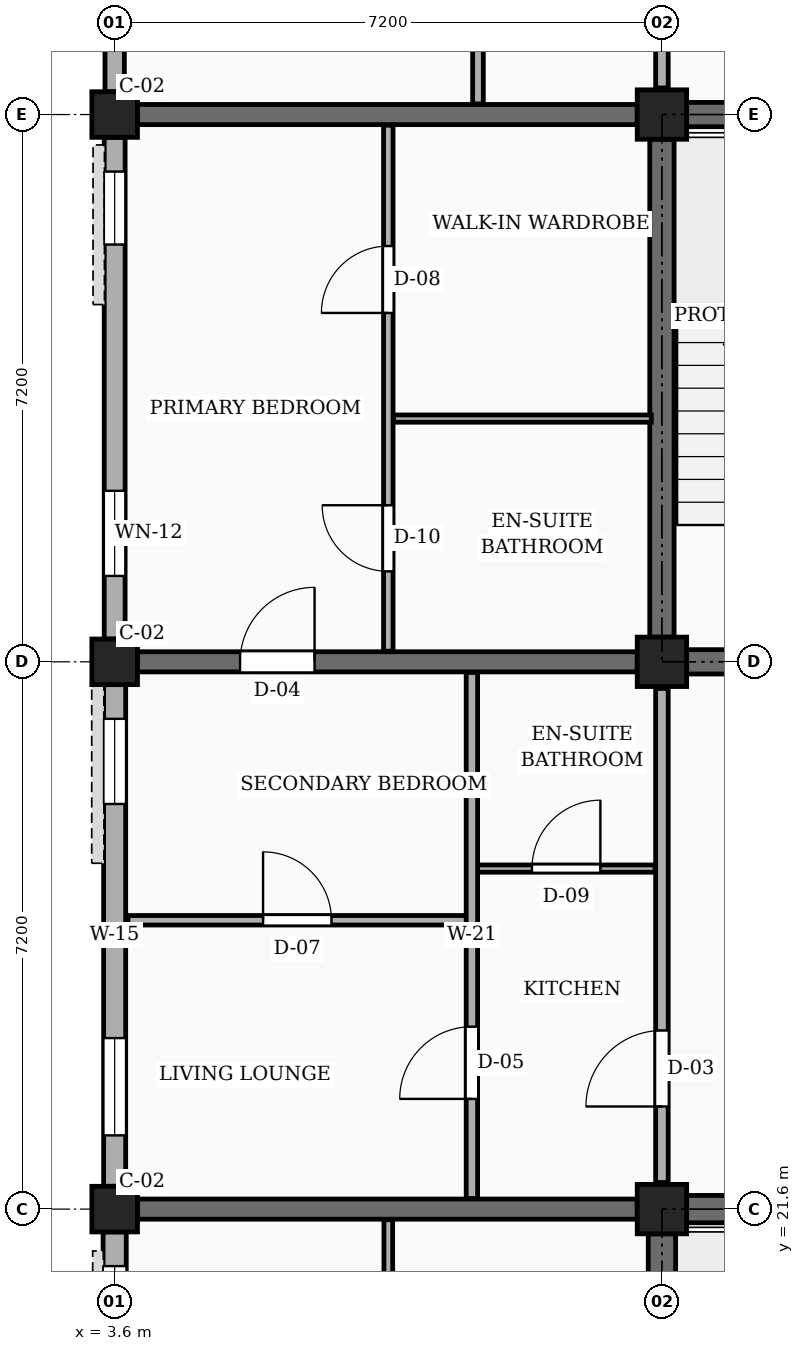
"""IFC4 building model, lengths in metres.
Left out: names, types, materials, properties, quantities, classifications, styles, units other than length and angle.
Written with IfcOpenShell. Run it as: python <this file> out.ifc"""

import sys

from ifc_helpers import new_model, si_unit, direction, frame, frame_2d, origin, origin_2d, place, context, subcontext, project, spatial, rectangle, extrude, element, fill, save


model = new_model("IFC4")
c1 = context("Model", 3, precision=1e-05, world=origin(), true_north=direction((0.0, 1.0)))
c2 = subcontext(c1, "Body", "Model", "MODEL_VIEW")
j1 = project(units=[si_unit("LENGTHUNIT", "METRE"), si_unit("PLANEANGLEUNIT", "RADIAN")], contexts=[c1])
p1 = place(None, origin())
s1 = spatial("IfcSite", under=j1, at=p1, CompositionType="ELEMENT")
p2 = place(p1, origin())
s2 = spatial("IfcBuilding", under=s1, at=p2, CompositionType="ELEMENT")
p3 = place(p2, frame((0.0, 0.0, 4.5)))
s3 = spatial("IfcBuildingStorey", under=s2, at=p3, CompositionType="ELEMENT", Elevation=4.5)
for number, where, z_axis, x_axis in (
    (1, (3.6, 21.6, 0.0), (0.0, 0.0, 1.0), (1.0, 0.0, 0.0)),
    (2, (3.6, 28.8, 0.0), (0.0, 0.0, 1.0), (1.0, 0.0, 0.0)),
    (3, (3.6, 36.0, 0.0), (0.0, 0.0, 1.0), (1.0, 0.0, 0.0)),
):
    element("IfcColumn", number, at=place(p3, frame(where, z_axis=z_axis, x_axis=x_axis)), inside=s3, PredefinedType="COLUMN", context=c2, shape_type="SweptSolid", body=[
        extrude(rectangle(XDim=0.6, YDim=0.6, at=origin_2d()), origin(), (0.0, 0.0, 1.0), 3.15),
    ])
for number, where, z_axis, x_axis in (
    (4, (10.8, 21.6, 0.0), (0.0, 0.0, 1.0), (1.0, 0.0, 0.0)),
    (5, (10.8, 28.8, 0.0), (0.0, 0.0, 1.0), (1.0, 0.0, 0.0)),
    (6, (10.8, 36.0, 0.0), (0.0, 0.0, 1.0), (1.0, 0.0, 0.0)),
):
    element("IfcColumn", number, at=place(p3, frame(where, z_axis=z_axis, x_axis=x_axis)), inside=s3, PredefinedType="COLUMN", context=c2, shape_type="SweptSolid", body=[
        extrude(rectangle(XDim=0.65, YDim=0.65, at=origin_2d()), origin(), (0.0, 0.0, 1.0), 3.15),
    ])
p4 = place(p3, frame((3.9, 21.6, 0.0), z_axis=(0.0, 0.0, 1.0), x_axis=(1.0, 0.0, 0.0)))
e7 = element("IfcWall", 7, at=p4, inside=s3, PredefinedType="SOLIDWALL", context=c2, shape_type="SweptSolid", body=[
    extrude(rectangle(XDim=6.575, YDim=0.265, at=frame_2d((3.288, 0.0))), origin(), (0.0, 0.0, 1.0), 2.17),
])
p5 = place(p3, frame((3.9, 28.8, 0.0), z_axis=(0.0, 0.0, 1.0), x_axis=(1.0, 0.0, 0.0)))
e8 = element("IfcWall", 8, at=p5, inside=s3, PredefinedType="SOLIDWALL", context=c2, shape_type="SweptSolid", body=[
    extrude(rectangle(XDim=6.575, YDim=0.265, at=frame_2d((3.288, 0.0))), origin(), (0.0, 0.0, 1.0), 2.17),
])
p6 = place(p5, frame((1.35, 0.0, 0.0)))
e9 = element("IfcOpeningElement", 9, at=p6, cuts=e8, PredefinedType="OPENING", context=c2, shape_type="SweptSolid", body=[
    extrude(rectangle(XDim=0.98, YDim=2.12, at=frame_2d((0.49, 1.06))), frame((0.0, 0.143, 0.0), z_axis=(0.0, -1.0, 0.0), x_axis=(1.0, 0.0, 0.0)), (0.0, 0.0, 1.0), 0.285),
])
p7 = place(p3, frame((3.9, 36.0, 0.0), z_axis=(0.0, 0.0, 1.0), x_axis=(1.0, 0.0, 0.0)))
e10 = element("IfcWall", 10, at=p7, inside=s3, PredefinedType="SOLIDWALL", context=c2, shape_type="SweptSolid", body=[
    extrude(rectangle(XDim=6.575, YDim=0.265, at=frame_2d((3.288, 0.0))), origin(), (0.0, 0.0, 1.0), 2.17),
])
p8 = place(p3, frame((3.6, 42.9, 0.0), z_axis=(0.0, 0.0, 1.0), x_axis=(0.0, -1.0, 0.0)))
e11 = element("IfcWall", 11, at=p8, inside=s3, PredefinedType="SOLIDWALL", context=c2, shape_type="SweptSolid", body=[
    extrude(rectangle(XDim=6.6, YDim=0.255, at=frame_2d((3.3, 0.0))), origin(), (0.0, 0.0, 1.0), 2.44),
])
p9 = place(p8, frame((0.45, 0.0, 0.78)))
e12 = element("IfcOpeningElement", 12, at=p9, cuts=e11, PredefinedType="OPENING", context=c2, shape_type="SweptSolid", body=[
    extrude(rectangle(XDim=1.4, YDim=1.15, at=frame_2d((0.7, 0.575))), frame((0.0, 0.137, 0.0), z_axis=(0.0, -1.0, 0.0), x_axis=(1.0, 0.0, 0.0)), (0.0, 0.0, 1.0), 0.275),
])
p10 = place(p8, frame((4.65, 0.0, 0.78)))
e13 = element("IfcOpeningElement", 13, at=p10, cuts=e11, PredefinedType="OPENING", context=c2, shape_type="SweptSolid", body=[
    extrude(rectangle(XDim=0.96, YDim=1.26, at=frame_2d((0.48, 0.63))), frame((0.0, 0.137, 0.0), z_axis=(0.0, -1.0, 0.0), x_axis=(1.0, 0.0, 0.0)), (0.0, 0.0, 1.0), 0.275),
])
p11 = place(p3, frame((3.6, 35.7, 0.0), z_axis=(0.0, 0.0, 1.0), x_axis=(0.0, -1.0, 0.0)))
e14 = element("IfcWall", 14, at=p11, inside=s3, PredefinedType="SOLIDWALL", context=c2, shape_type="SweptSolid", body=[
    extrude(rectangle(XDim=6.6, YDim=0.275, at=frame_2d((3.3, 0.0))), origin(), (0.0, 0.0, 1.0), 2.44),
])
p12 = place(p11, frame((0.45, 0.0, 0.78)))
e15 = element("IfcOpeningElement", 15, at=p12, cuts=e14, PredefinedType="OPENING", context=c2, shape_type="SweptSolid", body=[
    extrude(rectangle(XDim=0.96, YDim=1.26, at=frame_2d((0.48, 0.63))), frame((0.0, 0.147, 0.0), z_axis=(0.0, -1.0, 0.0), x_axis=(1.0, 0.0, 0.0)), (0.0, 0.0, 1.0), 0.295),
])
p13 = place(p11, frame((4.65, 0.0, 0.78)))
e16 = element("IfcOpeningElement", 16, at=p13, cuts=e14, PredefinedType="OPENING", context=c2, shape_type="SweptSolid", body=[
    extrude(rectangle(XDim=1.12, YDim=1.26, at=frame_2d((0.56, 0.63))), frame((0.0, 0.147, 0.0), z_axis=(0.0, -1.0, 0.0), x_axis=(1.0, 0.0, 0.0)), (0.0, 0.0, 1.0), 0.295),
])
p14 = place(p3, frame((3.6, 28.5, 0.0), z_axis=(0.0, 0.0, 1.0), x_axis=(0.0, -1.0, 0.0)))
e17 = element("IfcWall", 17, at=p14, inside=s3, PredefinedType="SOLIDWALL", context=c2, shape_type="SweptSolid", body=[
    extrude(rectangle(XDim=6.6, YDim=0.29, at=frame_2d((3.3, 0.0))), origin(), (0.0, 0.0, 1.0), 2.44),
])
p15 = place(p14, frame((0.45, 0.0, 0.78)))
e18 = element("IfcOpeningElement", 18, at=p15, cuts=e17, PredefinedType="OPENING", context=c2, shape_type="SweptSolid", body=[
    extrude(rectangle(XDim=1.12, YDim=1.26, at=frame_2d((0.56, 0.63))), frame((0.0, 0.155, 0.0), z_axis=(0.0, -1.0, 0.0), x_axis=(1.0, 0.0, 0.0)), (0.0, 0.0, 1.0), 0.31),
])
p16 = place(p14, frame((4.65, 0.0, 0.78)))
e19 = element("IfcOpeningElement", 19, at=p16, cuts=e17, PredefinedType="OPENING", context=c2, shape_type="SweptSolid", body=[
    extrude(rectangle(XDim=1.28, YDim=1.26, at=frame_2d((0.64, 0.63))), frame((0.0, 0.155, 0.0), z_axis=(0.0, -1.0, 0.0), x_axis=(1.0, 0.0, 0.0)), (0.0, 0.0, 1.0), 0.31),
])
p17 = place(p3, frame((3.6, 21.3, 0.0), z_axis=(0.0, 0.0, 1.0), x_axis=(0.0, -1.0, 0.0)))
e20 = element("IfcWall", 20, at=p17, inside=s3, PredefinedType="SOLIDWALL", context=c2, shape_type="SweptSolid", body=[
    extrude(rectangle(XDim=6.6, YDim=0.305, at=frame_2d((3.3, 0.0))), origin(), (0.0, 0.0, 1.0), 2.44),
])
p18 = place(p17, frame((0.45, 0.0, 0.78)))
e21 = element("IfcOpeningElement", 21, at=p18, cuts=e20, PredefinedType="OPENING", context=c2, shape_type="SweptSolid", body=[
    extrude(rectangle(XDim=1.28, YDim=1.26, at=frame_2d((0.64, 0.63))), frame((0.0, 0.163, 0.0), z_axis=(0.0, -1.0, 0.0), x_axis=(1.0, 0.0, 0.0)), (0.0, 0.0, 1.0), 0.325),
])
p19 = place(p17, frame((4.65, 0.0, 0.78)))
e22 = element("IfcOpeningElement", 22, at=p19, cuts=e20, PredefinedType="OPENING", context=c2, shape_type="SweptSolid", body=[
    extrude(rectangle(XDim=1.44, YDim=1.26, at=frame_2d((0.72, 0.63))), frame((0.0, 0.163, 0.0), z_axis=(0.0, -1.0, 0.0), x_axis=(1.0, 0.0, 0.0)), (0.0, 0.0, 1.0), 0.325),
])
p20 = place(p3, frame((10.8, 14.725, 0.0), z_axis=(0.0, 0.0, 1.0), x_axis=(0.0, 1.0, 0.0)))
e23 = element("IfcWall", 23, at=p20, inside=s3, PredefinedType="SHEAR", context=c2, shape_type="SweptSolid", body=[
    extrude(rectangle(XDim=6.55, YDim=0.36, at=frame_2d((3.275, 0.0))), origin(), (0.0, 0.0, 1.0), 2.87),
])
p21 = place(p3, frame((11.125, 21.6, 0.0), z_axis=(0.0, 0.0, 1.0), x_axis=(1.0, 0.0, 0.0)))
e24 = element("IfcWall", 24, at=p21, inside=s3, PredefinedType="SHEAR", context=c2, shape_type="SweptSolid", body=[
    extrude(rectangle(XDim=6.55, YDim=0.36, at=frame_2d((3.275, 0.0))), origin(), (0.0, 0.0, 1.0), 2.87),
])
for number, where, z_axis, x_axis in (
    (25, (10.8, 29.125, 0.0), (0.0, 0.0, 1.0), (0.0, 1.0, 0.0)),
    (26, (11.125, 36.0, 0.0), (0.0, 0.0, 1.0), (1.0, 0.0, 0.0)),
    (27, (11.125, 28.8, 0.0), (0.0, 0.0, 1.0), (1.0, 0.0, 0.0)),
):
    element("IfcWall", number, at=place(p3, frame(where, z_axis=z_axis, x_axis=x_axis)), inside=s3, PredefinedType="SHEAR", context=c2, shape_type="SweptSolid", body=[
        extrude(rectangle(XDim=6.55, YDim=0.32, at=frame_2d((3.275, 0.0))), origin(), (0.0, 0.0, 1.0), 2.87),
    ])
p22 = place(p3, frame((10.8, 21.95, 0.0), z_axis=(0.0, 0.0, 1.0), x_axis=(0.0, 1.0, 0.0)))
e28 = element("IfcWall", 28, at=p22, inside=s3, PredefinedType="PARTITIONING", context=c2, shape_type="SweptSolid", body=[
    extrude(rectangle(XDim=6.5, YDim=0.165, at=frame_2d((3.25, 0.0))), origin(), (0.0, 0.0, 1.0), 2.22),
])
p23 = place(p22, frame((1.0, 0.0, 0.0)))
e29 = element("IfcOpeningElement", 29, at=p23, cuts=e28, PredefinedType="OPENING", context=c2, shape_type="SweptSolid", body=[
    extrude(rectangle(XDim=1.0, YDim=2.15, at=frame_2d((0.5, 1.075))), frame((0.0, 0.093, 0.0), z_axis=(0.0, -1.0, 0.0), x_axis=(1.0, 0.0, 0.0)), (0.0, 0.0, 1.0), 0.185),
])
p24 = place(p3, frame((10.8, 36.35, 0.0), z_axis=(0.0, 0.0, 1.0), x_axis=(0.0, 1.0, 0.0)))
e30 = element("IfcWall", 30, at=p24, inside=s3, PredefinedType="PARTITIONING", context=c2, shape_type="SweptSolid", body=[
    extrude(rectangle(XDim=6.5, YDim=0.165, at=frame_2d((3.25, 0.0))), origin(), (0.0, 0.0, 1.0), 2.22),
])
p25 = place(p24, frame((1.0, 0.0, 0.0)))
e31 = element("IfcOpeningElement", 31, at=p25, cuts=e30, PredefinedType="OPENING", context=c2, shape_type="SweptSolid", body=[
    extrude(rectangle(XDim=0.94, YDim=2.12, at=frame_2d((0.47, 1.06))), frame((0.0, 0.093, 0.0), z_axis=(0.0, -1.0, 0.0), x_axis=(1.0, 0.0, 0.0)), (0.0, 0.0, 1.0), 0.185),
])
p26 = place(p3, frame((7.2, 14.54, 0.0), z_axis=(0.0, 0.0, 1.0), x_axis=(0.0, 1.0, 0.0)))
e32 = element("IfcWall", 32, at=p26, inside=s3, PredefinedType="PARTITIONING", context=c2, shape_type="SweptSolid", body=[
    extrude(rectangle(XDim=6.92, YDim=0.115, at=frame_2d((3.46, 0.0))), origin(), (0.0, 0.0, 1.0), 2.305),
])
p27 = place(p26, frame((1.05, 0.0, 0.0)))
e33 = element("IfcOpeningElement", 33, at=p27, cuts=e32, PredefinedType="OPENING", context=c2, shape_type="SweptSolid", body=[
    extrude(rectangle(XDim=0.87, YDim=2.05, at=frame_2d((0.435, 1.025))), frame((0.0, 0.067, 0.0), z_axis=(0.0, -1.0, 0.0), x_axis=(1.0, 0.0, 0.0)), (0.0, 0.0, 1.0), 0.135),
])
p28 = place(p26, frame((4.45, 0.0, 0.0)))
e34 = element("IfcOpeningElement", 34, at=p28, cuts=e32, PredefinedType="OPENING", context=c2, shape_type="SweptSolid", body=[
    extrude(rectangle(XDim=0.88, YDim=2.08, at=frame_2d((0.44, 1.04))), frame((0.0, 0.067, 0.0), z_axis=(0.0, -1.0, 0.0), x_axis=(1.0, 0.0, 0.0)), (0.0, 0.0, 1.0), 0.135),
])
p29 = place(p3, frame((3.775, 25.4, 0.0), z_axis=(0.0, 0.0, 1.0), x_axis=(1.0, 0.0, 0.0)))
e35 = element("IfcWall", 35, at=p29, inside=s3, PredefinedType="PARTITIONING", context=c2, shape_type="SweptSolid", body=[
    extrude(rectangle(XDim=4.455, YDim=0.125, at=frame_2d((2.228, 0.0))), origin(), (0.0, 0.0, 1.0), 2.305),
])
p30 = place(p29, frame((1.778, 0.0, 0.0)))
e36 = element("IfcOpeningElement", 36, at=p30, cuts=e35, PredefinedType="OPENING", context=c2, shape_type="SweptSolid", body=[
    extrude(rectangle(XDim=0.9, YDim=2.1, at=frame_2d((0.45, 1.05))), frame((0.0, 0.073, 0.0), z_axis=(0.0, -1.0, 0.0), x_axis=(1.0, 0.0, 0.0)), (0.0, 0.0, 1.0), 0.145),
])
p31 = place(p3, frame((8.37, 26.08, 0.0), z_axis=(0.0, 0.0, 1.0), x_axis=(1.0, 0.0, 0.0)))
e37 = element("IfcWall", 37, at=p31, inside=s3, PredefinedType="PARTITIONING", context=c2, shape_type="SweptSolid", body=[
    extrude(rectangle(XDim=2.34, YDim=0.095, at=frame_2d((1.17, 0.0))), origin(), (0.0, 0.0, 1.0), 2.305),
])
p32 = place(p31, frame((0.72, 0.0, 0.0)))
e38 = element("IfcOpeningElement", 38, at=p32, cuts=e37, PredefinedType="OPENING", context=c2, shape_type="SweptSolid", body=[
    extrude(rectangle(XDim=0.9, YDim=2.05, at=frame_2d((0.45, 1.025))), frame((0.0, 0.058, 0.0), z_axis=(0.0, -1.0, 0.0), x_axis=(1.0, 0.0, 0.0)), (0.0, 0.0, 1.0), 0.115),
])
p33 = place(p3, frame((8.3, 21.74, 0.0), z_axis=(0.0, 0.0, 1.0), x_axis=(0.0, 1.0, 0.0)))
e39 = element("IfcWall", 39, at=p33, inside=s3, PredefinedType="PARTITIONING", context=c2, shape_type="SweptSolid", body=[
    extrude(rectangle(XDim=6.92, YDim=0.15, at=frame_2d((3.46, 0.0))), origin(), (0.0, 0.0, 1.0), 2.305),
])
p34 = place(p33, frame((1.31, 0.0, 0.0)))
e40 = element("IfcOpeningElement", 40, at=p34, cuts=e39, PredefinedType="OPENING", context=c2, shape_type="SweptSolid", body=[
    extrude(rectangle(XDim=0.95, YDim=2.1, at=frame_2d((0.475, 1.05))), frame((0.0, 0.085, 0.0), z_axis=(0.0, -1.0, 0.0), x_axis=(1.0, 0.0, 0.0)), (0.0, 0.0, 1.0), 0.17),
])
p35 = place(p3, frame((7.2, 28.94, 0.0), z_axis=(0.0, 0.0, 1.0), x_axis=(0.0, 1.0, 0.0)))
e41 = element("IfcWall", 41, at=p35, inside=s3, PredefinedType="PARTITIONING", context=c2, shape_type="SweptSolid", body=[
    extrude(rectangle(XDim=6.92, YDim=0.125, at=frame_2d((3.46, 0.0))), origin(), (0.0, 0.0, 1.0), 2.305),
])
p36 = place(p35, frame((1.05, 0.0, 0.0)))
e42 = element("IfcOpeningElement", 42, at=p36, cuts=e41, PredefinedType="OPENING", context=c2, shape_type="SweptSolid", body=[
    extrude(rectangle(XDim=0.87, YDim=2.05, at=frame_2d((0.435, 1.025))), frame((0.0, 0.073, 0.0), z_axis=(0.0, -1.0, 0.0), x_axis=(1.0, 0.0, 0.0)), (0.0, 0.0, 1.0), 0.145),
])
p37 = place(p35, frame((4.45, 0.0, 0.0)))
e43 = element("IfcOpeningElement", 43, at=p37, cuts=e41, PredefinedType="OPENING", context=c2, shape_type="SweptSolid", body=[
    extrude(rectangle(XDim=0.88, YDim=2.08, at=frame_2d((0.44, 1.04))), frame((0.0, 0.073, 0.0), z_axis=(0.0, -1.0, 0.0), x_axis=(1.0, 0.0, 0.0)), (0.0, 0.0, 1.0), 0.145),
])
p38 = place(p3, frame((7.27, 32.0, 0.0), z_axis=(0.0, 0.0, 1.0), x_axis=(1.0, 0.0, 0.0)))
e44 = element("IfcWall", 44, at=p38, inside=s3, PredefinedType="PARTITIONING", context=c2, shape_type="SweptSolid", body=[
    extrude(rectangle(XDim=3.39, YDim=0.095, at=frame_2d((1.695, 0.0))), origin(), (0.0, 0.0, 1.0), 2.305),
])
p39 = place(p3, frame((8.38, 36.14, 0.0), z_axis=(0.0, 0.0, 1.0), x_axis=(0.0, 1.0, 0.0)))
e45 = element("IfcWall", 45, at=p39, inside=s3, PredefinedType="PARTITIONING", context=c2, shape_type="SweptSolid", body=[
    extrude(rectangle(XDim=6.92, YDim=0.14, at=frame_2d((3.46, 0.0))), origin(), (0.0, 0.0, 1.0), 2.305),
])
p40 = place(p39, frame((1.31, 0.0, 0.0)))
e46 = element("IfcOpeningElement", 46, at=p40, cuts=e45, PredefinedType="OPENING", context=c2, shape_type="SweptSolid", body=[
    extrude(rectangle(XDim=0.92, YDim=2.1, at=frame_2d((0.46, 1.05))), frame((0.0, 0.08, 0.0), z_axis=(0.0, -1.0, 0.0), x_axis=(1.0, 0.0, 0.0)), (0.0, 0.0, 1.0), 0.16),
])
p41 = place(p12, origin())
e47 = element("IfcWindow", 47, at=p41, inside=s3, PartitioningType="SINGLE_PANEL", PredefinedType="WINDOW", context=c2, shape_type="SweptSolid", body=[
    extrude(rectangle(XDim=0.96, YDim=1.26, at=frame_2d((0.48, 0.63))), frame((0.0, 0.03, 0.0), z_axis=(0.0, -1.0, 0.0), x_axis=(1.0, 0.0, 0.0)), (0.0, 0.0, 1.0), 0.06),
])
fill(e15, e47)
p42 = place(p13, origin())
e48 = element("IfcWindow", 48, at=p42, inside=s3, PartitioningType="SINGLE_PANEL", PredefinedType="WINDOW", context=c2, shape_type="SweptSolid", body=[
    extrude(rectangle(XDim=1.12, YDim=1.26, at=frame_2d((0.56, 0.63))), frame((0.0, 0.03, 0.0), z_axis=(0.0, -1.0, 0.0), x_axis=(1.0, 0.0, 0.0)), (0.0, 0.0, 1.0), 0.06),
])
fill(e16, e48)
p43 = place(p15, origin())
e49 = element("IfcWindow", 49, at=p43, inside=s3, PartitioningType="SINGLE_PANEL", PredefinedType="WINDOW", context=c2, shape_type="SweptSolid", body=[
    extrude(rectangle(XDim=1.12, YDim=1.26, at=frame_2d((0.56, 0.63))), frame((0.0, 0.03, 0.0), z_axis=(0.0, -1.0, 0.0), x_axis=(1.0, 0.0, 0.0)), (0.0, 0.0, 1.0), 0.06),
])
fill(e18, e49)
p44 = place(p16, origin())
e50 = element("IfcWindow", 50, at=p44, inside=s3, PartitioningType="SINGLE_PANEL", PredefinedType="WINDOW", context=c2, shape_type="SweptSolid", body=[
    extrude(rectangle(XDim=1.28, YDim=1.26, at=frame_2d((0.64, 0.63))), frame((0.0, 0.03, 0.0), z_axis=(0.0, -1.0, 0.0), x_axis=(1.0, 0.0, 0.0)), (0.0, 0.0, 1.0), 0.06),
])
fill(e19, e50)
p45 = place(p18, origin())
e51 = element("IfcWindow", 51, at=p45, inside=s3, PartitioningType="SINGLE_PANEL", PredefinedType="WINDOW", context=c2, shape_type="SweptSolid", body=[
    extrude(rectangle(XDim=1.28, YDim=1.26, at=frame_2d((0.64, 0.63))), frame((0.0, 0.03, 0.0), z_axis=(0.0, -1.0, 0.0), x_axis=(1.0, 0.0, 0.0)), (0.0, 0.0, 1.0), 0.06),
])
fill(e21, e51)
p46 = place(p23, origin())
e52 = element("IfcDoor", 52, at=p46, inside=s3, OperationType="SINGLE_SWING_LEFT", PredefinedType="DOOR", context=c2, shape_type="SweptSolid", body=[
    extrude(rectangle(XDim=1.0, YDim=2.15, at=frame_2d((0.5, 1.075))), frame((0.0, 0.025, 0.0), z_axis=(0.0, -1.0, 0.0), x_axis=(1.0, 0.0, 0.0)), (0.0, 0.0, 1.0), 0.05),
])
fill(e29, e52)
p47 = place(p30, origin())
e53 = element("IfcDoor", 53, at=p47, inside=s3, OperationType="SINGLE_SWING_LEFT", PredefinedType="DOOR", context=c2, shape_type="SweptSolid", body=[
    extrude(rectangle(XDim=0.9, YDim=2.1, at=frame_2d((0.45, 1.05))), frame((0.0, 0.025, 0.0), z_axis=(0.0, -1.0, 0.0), x_axis=(1.0, 0.0, 0.0)), (0.0, 0.0, 1.0), 0.05),
])
fill(e36, e53)
p48 = place(p32, origin())
e54 = element("IfcDoor", 54, at=p48, inside=s3, OperationType="SINGLE_SWING_RIGHT", PredefinedType="DOOR", context=c2, shape_type="SweptSolid", body=[
    extrude(rectangle(XDim=0.9, YDim=2.05, at=frame_2d((0.45, 1.025))), frame((0.0, 0.025, 0.0), z_axis=(0.0, -1.0, 0.0), x_axis=(1.0, 0.0, 0.0)), (0.0, 0.0, 1.0), 0.05),
])
fill(e38, e54)
p49 = place(p34, origin())
e55 = element("IfcDoor", 55, at=p49, inside=s3, OperationType="SINGLE_SWING_LEFT", PredefinedType="DOOR", context=c2, shape_type="SweptSolid", body=[
    extrude(rectangle(XDim=0.95, YDim=2.1, at=frame_2d((0.475, 1.05))), frame((0.0, 0.025, 0.0), z_axis=(0.0, -1.0, 0.0), x_axis=(1.0, 0.0, 0.0)), (0.0, 0.0, 1.0), 0.05),
])
fill(e40, e55)
p50 = place(p36, origin())
e56 = element("IfcDoor", 56, at=p50, inside=s3, OperationType="SINGLE_SWING_RIGHT", PredefinedType="DOOR", context=c2, shape_type="SweptSolid", body=[
    extrude(rectangle(XDim=0.87, YDim=2.05, at=frame_2d((0.435, 1.025))), frame((0.0, 0.025, 0.0), z_axis=(0.0, -1.0, 0.0), x_axis=(1.0, 0.0, 0.0)), (0.0, 0.0, 1.0), 0.05),
])
fill(e42, e56)
p51 = place(p37, origin())
e57 = element("IfcDoor", 57, at=p51, inside=s3, OperationType="SINGLE_SWING_LEFT", PredefinedType="DOOR", context=c2, shape_type="SweptSolid", body=[
    extrude(rectangle(XDim=0.88, YDim=2.08, at=frame_2d((0.44, 1.04))), frame((0.0, 0.025, 0.0), z_axis=(0.0, -1.0, 0.0), x_axis=(1.0, 0.0, 0.0)), (0.0, 0.0, 1.0), 0.05),
])
fill(e43, e57)
p52 = place(p6, origin())
e58 = element("IfcDoor", 58, at=p52, inside=s3, OperationType="SINGLE_SWING_RIGHT", PredefinedType="DOOR", context=c2, shape_type="SweptSolid", body=[
    extrude(rectangle(XDim=0.98, YDim=2.12, at=frame_2d((0.49, 1.06))), frame((0.0, 0.025, 0.0), z_axis=(0.0, -1.0, 0.0), x_axis=(1.0, 0.0, 0.0)), (0.0, 0.0, 1.0), 0.05),
])
fill(e9, e58)
save(model, sys.argv[1])
